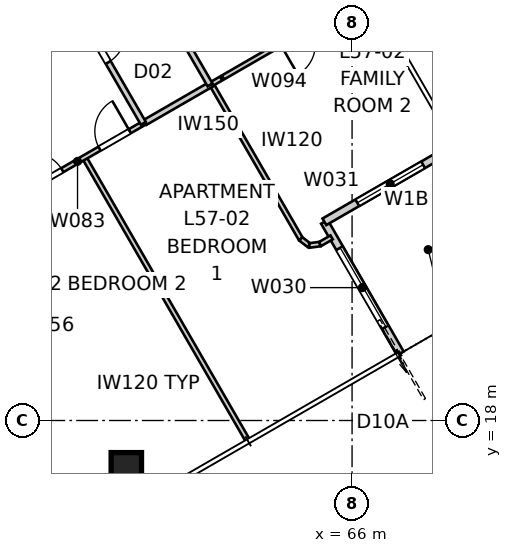
"""IFC4 building model, lengths in metres.
Left out: names, types, materials, properties, quantities, classifications, styles, units other than length and angle.
Written with IfcOpenShell. Run it as: python <this file> out.ifc"""

import sys

from ifc_helpers import new_model, si_unit, direction, frame, frame_2d, origin, origin_2d, place, context, subcontext, project, spatial, rectangle, extrude, element, fill, save


model = new_model("IFC4")
c1 = context("Model", 3, precision=1e-05, world=origin(), true_north=direction((0.0, 1.0)))
c2 = subcontext(c1, "Body", "Model", "MODEL_VIEW")
j1 = project(units=[si_unit("LENGTHUNIT", "METRE"), si_unit("PLANEANGLEUNIT", "RADIAN")], contexts=[c1])
p1 = place(None, origin())
s1 = spatial("IfcSite", under=j1, at=p1, CompositionType="ELEMENT")
p2 = place(p1, origin())
s2 = spatial("IfcBuilding", under=s1, at=p2, CompositionType="ELEMENT")
p3 = place(p2, frame((0.0, 0.0, 208.2)))
s3 = spatial("IfcBuildingStorey", under=s2, at=p3, CompositionType="ELEMENT", Elevation=208.2)
p4 = place(p3, frame((60.06, 16.755, -0.15), z_axis=(0.0, 0.0, 1.0), x_axis=(1.0, 0.0, 0.0)))
e1 = element("IfcColumn", 1, at=p4, inside=s3, PredefinedType="COLUMN", context=c2, shape_type="SweptSolid", body=[
    extrude(rectangle(XDim=0.8, YDim=0.8, at=origin_2d()), origin(), (0.0, 0.0, 1.0), 3.55),
])
p5 = place(p3, frame((67.271, 19.764, 0.0), z_axis=(0.0, 0.0, 1.0), x_axis=(-0.49999894854, 0.866026010844, 0.0)))
e2 = element("IfcWall", 2, at=p5, inside=s3, PredefinedType="SOLIDWALL", context=c2, shape_type="SweptSolid", body=[
    extrude(rectangle(XDim=4.0, YDim=0.2, at=frame_2d((2.0, 0.0))), origin(), (0.0, 0.0, 1.0), 3.25),
])
p6 = place(p5, frame((0.8, 0.0, 0.0)))
e3 = element("IfcOpeningElement", 3, at=p6, cuts=e2, PredefinedType="OPENING", context=c2, shape_type="SweptSolid", body=[
    extrude(rectangle(XDim=2.4, YDim=2.1, at=frame_2d((1.2, 1.05))), frame((0.0, 0.11, 0.0), z_axis=(0.0, -1.0, 0.0), x_axis=(1.0, 0.0, 0.0)), (0.0, 0.0, 1.0), 0.22),
])
p7 = place(p3, frame((65.271, 23.229, 0.0), z_axis=(0.0, 0.0, 1.0), x_axis=(0.866026010844, 0.49999894854, 0.0)))
e4 = element("IfcWall", 4, at=p7, inside=s3, PredefinedType="SOLIDWALL", context=c2, shape_type="SweptSolid", body=[
    extrude(rectangle(XDim=4.0, YDim=0.2, at=frame_2d((2.0, 0.0))), origin(), (0.0, 0.0, 1.0), 3.25),
])
p8 = place(p7, frame((1.0, 0.0, 0.45)))
e5 = element("IfcOpeningElement", 5, at=p8, cuts=e4, PredefinedType="OPENING", context=c2, shape_type="SweptSolid", body=[
    extrude(rectangle(XDim=2.0, YDim=1.8, at=frame_2d((1.0, 0.9))), frame((0.0, 0.11, 0.0), z_axis=(0.0, -1.0, 0.0), x_axis=(1.0, 0.0, 0.0)), (0.0, 0.0, 1.0), 0.22),
])
p9 = place(p3, frame((64.111, 33.239, 0.0), z_axis=(0.0, 0.0, 1.0), x_axis=(-0.866024069551, -0.500002310952, 0.0)))
e6 = element("IfcWall", 6, at=p9, inside=s3, PredefinedType="PARTITIONING", context=c2, shape_type="SweptSolid", body=[
    extrude(rectangle(XDim=10.95, YDim=0.25, at=frame_2d((5.475, 0.0))), origin(), (0.0, 0.0, 1.0), 3.25),
])
p10 = place(p3, frame((63.246, 17.487, 0.0), z_axis=(0.0, 0.0, 1.0), x_axis=(-0.49999898161, 0.866025991751, 0.0)))
e7 = element("IfcWall", 7, at=p10, inside=s3, PredefinedType="PARTITIONING", context=c2, shape_type="SweptSolid", body=[
    extrude(rectangle(XDim=8.585, YDim=0.12, at=frame_2d((4.292, 0.0))), origin(), (0.0, 0.0, 1.0), 3.25),
])
p11 = place(p3, frame((57.0, 23.793, 0.0), z_axis=(0.0, 0.0, 1.0), x_axis=(0.866007146345, 0.50003162148, 0.0)))
e8 = element("IfcWall", 8, at=p11, inside=s3, PredefinedType="PARTITIONING", context=c2, shape_type="SweptSolid", body=[
    extrude(rectangle(XDim=4.101, YDim=0.12, at=frame_2d((2.051, 0.0))), origin(), (0.0, 0.0, 1.0), 3.25),
])
p12 = place(p11, frame((0.668, 0.0, 0.0)))
e9 = element("IfcOpeningElement", 9, at=p12, cuts=e8, PredefinedType="OPENING", context=c2, shape_type="SweptSolid", body=[
    extrude(rectangle(XDim=0.92, YDim=2.34, at=frame_2d((0.46, 1.17))), frame((0.0, 0.07, 0.0), z_axis=(0.0, -1.0, 0.0), x_axis=(1.0, 0.0, 0.0)), (0.0, 0.0, 1.0), 0.14),
])
p13 = place(p11, frame((2.719, 0.0, 0.0)))
e10 = element("IfcOpeningElement", 10, at=p13, cuts=e8, PredefinedType="OPENING", context=c2, shape_type="SweptSolid", body=[
    extrude(rectangle(XDim=0.92, YDim=2.34, at=frame_2d((0.46, 1.17))), frame((0.0, 0.07, 0.0), z_axis=(0.0, -1.0, 0.0), x_axis=(1.0, 0.0, 0.0)), (0.0, 0.0, 1.0), 0.14),
])
p14 = place(p3, frame((62.299, 26.853, 0.0), z_axis=(0.0, 0.0, 1.0), x_axis=(0.500006955494, -0.866021387991, 0.0)))
e11 = element("IfcWall", 11, at=p14, inside=s3, PredefinedType="PARTITIONING", context=c2, shape_type="SweptSolid", body=[
    extrude(rectangle(XDim=4.705, YDim=0.12, at=frame_2d((2.352, 0.0))), origin(), (0.0, 0.0, 1.0), 3.25),
])
p15 = place(p3, frame((64.651, 22.778, 0.0), z_axis=(0.0, 0.0, 1.0), x_axis=(0.793231928283, -0.608919623557, 0.0)))
e12 = element("IfcWall", 12, at=p15, inside=s3, PredefinedType="PARTITIONING", context=c2, shape_type="SweptSolid", body=[
    extrude(rectangle(XDim=0.283, YDim=0.12, at=frame_2d((0.142, 0.0))), origin(), (0.0, 0.0, 1.0), 3.25),
])
p16 = place(p3, frame((64.876, 22.606, 0.0), z_axis=(0.0, 0.0, 1.0), x_axis=(0.991407364485, 0.130810693925, 0.0)))
e13 = element("IfcWall", 13, at=p16, inside=s3, PredefinedType="PARTITIONING", context=c2, shape_type="SweptSolid", body=[
    extrude(rectangle(XDim=0.284, YDim=0.12, at=frame_2d((0.142, 0.0))), origin(), (0.0, 0.0, 1.0), 3.25),
])
p17 = place(p3, frame((65.157, 22.643, 0.0), z_axis=(0.0, 0.0, 1.0), x_axis=(0.866058575552, 0.499942540411, 0.0)))
e14 = element("IfcWall", 14, at=p17, inside=s3, PredefinedType="PARTITIONING", context=c2, shape_type="SweptSolid", body=[
    extrude(rectangle(XDim=0.352, YDim=0.12, at=frame_2d((0.176, 0.0))), origin(), (0.0, 0.0, 1.0), 3.25),
])
p18 = place(p3, frame((60.552, 25.844, 0.0), z_axis=(0.0, 0.0, 1.0), x_axis=(0.866074730264, 0.499914554297, 0.0)))
e15 = element("IfcWall", 15, at=p18, inside=s3, PredefinedType="SOLIDWALL", context=c2, shape_type="SweptSolid", body=[
    extrude(rectangle(XDim=2.017, YDim=0.15, at=frame_2d((1.008, 0.0))), origin(), (0.0, 0.0, 1.0), 3.25),
])
p19 = place(p3, frame((62.555, 27.0, 0.0), z_axis=(0.0, 0.0, 1.0), x_axis=(-0.865896854829, -0.500222587251, 0.0)))
e16 = element("IfcWall", 16, at=p19, inside=s3, PredefinedType="PARTITIONING", context=c2, shape_type="SweptSolid", body=[
    extrude(rectangle(XDim=0.296, YDim=0.12, at=frame_2d((0.148, 0.0))), origin(), (0.0, 0.0, 1.0), 3.25),
])
p20 = place(p3, frame((66.388, 29.214, 0.0), z_axis=(0.0, 0.0, 1.0), x_axis=(-0.866032173762, -0.499988273872, 0.0)))
e17 = element("IfcWall", 17, at=p20, inside=s3, PredefinedType="PARTITIONING", context=c2, shape_type="SweptSolid", body=[
    extrude(rectangle(XDim=4.373, YDim=0.12, at=frame_2d((2.186, 0.0))), origin(), (0.0, 0.0, 1.0), 3.25),
])
p21 = place(p20, frame((1.706, 0.0, 0.0)))
e18 = element("IfcOpeningElement", 18, at=p21, cuts=e17, PredefinedType="OPENING", context=c2, shape_type="SweptSolid", body=[
    extrude(rectangle(XDim=0.92, YDim=2.34, at=frame_2d((0.46, 1.17))), frame((0.0, 0.07, 0.0), z_axis=(0.0, -1.0, 0.0), x_axis=(1.0, 0.0, 0.0)), (0.0, 0.0, 1.0), 0.14),
])
p22 = place(p3, frame((62.263, 26.832, 0.0), z_axis=(0.0, 0.0, 1.0), x_axis=(-0.499999662836, 0.866025598446, 0.0)))
e19 = element("IfcWall", 19, at=p22, inside=s3, PredefinedType="SOLIDWALL", context=c2, shape_type="SweptSolid", body=[
    extrude(rectangle(XDim=4.625, YDim=0.15, at=frame_2d((2.312, 0.0))), origin(), (0.0, 0.0, 1.0), 3.25),
])
p23 = place(p22, frame((1.853, 0.0, 0.0)))
e20 = element("IfcOpeningElement", 20, at=p23, cuts=e19, PredefinedType="OPENING", context=c2, shape_type="SweptSolid", body=[
    extrude(rectangle(XDim=0.92, YDim=2.34, at=frame_2d((0.46, 1.17))), frame((0.0, 0.085, 0.0), z_axis=(0.0, -1.0, 0.0), x_axis=(1.0, 0.0, 0.0)), (0.0, 0.0, 1.0), 0.17),
])
p24 = place(p3, frame((58.196, 29.824, 0.0), z_axis=(0.0, 0.0, 1.0), x_axis=(0.499999662836, -0.866025598446, 0.0)))
e21 = element("IfcWall", 21, at=p24, inside=s3, PredefinedType="SOLIDWALL", context=c2, shape_type="SweptSolid", body=[
    extrude(rectangle(XDim=4.625, YDim=0.15, at=frame_2d((2.312, 0.0))), origin(), (0.0, 0.0, 1.0), 3.25),
])
p25 = place(p24, frame((1.853, 0.0, 0.0)))
e22 = element("IfcOpeningElement", 22, at=p25, cuts=e21, PredefinedType="OPENING", context=c2, shape_type="SweptSolid", body=[
    extrude(rectangle(XDim=0.92, YDim=2.34, at=frame_2d((0.46, 1.17))), frame((0.0, 0.085, 0.0), z_axis=(0.0, -1.0, 0.0), x_axis=(1.0, 0.0, 0.0)), (0.0, 0.0, 1.0), 0.17),
])
p26 = place(p6, origin())
e23 = element("IfcDoor", 23, at=p26, inside=s3, OperationType="SLIDING_TO_LEFT", PredefinedType="DOOR", context=c2, shape_type="SweptSolid", body=[
    extrude(rectangle(XDim=2.4, YDim=2.1, at=frame_2d((1.2, 1.05))), frame((0.0, 0.025, 0.0), z_axis=(0.0, -1.0, 0.0), x_axis=(1.0, 0.0, 0.0)), (0.0, 0.0, 1.0), 0.05),
])
fill(e3, e23)
p27 = place(p8, origin())
e24 = element("IfcWindow", 24, at=p27, inside=s3, PartitioningType="SINGLE_PANEL", PredefinedType="WINDOW", context=c2, shape_type="SweptSolid", body=[
    extrude(rectangle(XDim=2.0, YDim=1.8, at=frame_2d((1.0, 0.9))), frame((0.0, 0.03, 0.0), z_axis=(0.0, -1.0, 0.0), x_axis=(1.0, 0.0, 0.0)), (0.0, 0.0, 1.0), 0.06),
])
fill(e5, e24)
p28 = place(p25, origin())
e25 = element("IfcDoor", 25, at=p28, inside=s3, OperationType="SINGLE_SWING_LEFT", PredefinedType="DOOR", context=c2, shape_type="SweptSolid", body=[
    extrude(rectangle(XDim=0.92, YDim=2.34, at=frame_2d((0.46, 1.17))), frame((0.0, 0.025, 0.0), z_axis=(0.0, -1.0, 0.0), x_axis=(1.0, 0.0, 0.0)), (0.0, 0.0, 1.0), 0.05),
])
fill(e22, e25)
p29 = place(p12, origin())
e26 = element("IfcDoor", 26, at=p29, inside=s3, OperationType="SINGLE_SWING_LEFT", PredefinedType="DOOR", context=c2, shape_type="SweptSolid", body=[
    extrude(rectangle(XDim=0.92, YDim=2.34, at=frame_2d((0.46, 1.17))), frame((0.0, 0.025, 0.0), z_axis=(0.0, -1.0, 0.0), x_axis=(1.0, 0.0, 0.0)), (0.0, 0.0, 1.0), 0.05),
])
fill(e9, e26)
p30 = place(p13, origin())
e27 = element("IfcDoor", 27, at=p30, inside=s3, OperationType="SINGLE_SWING_RIGHT", PredefinedType="DOOR", context=c2, shape_type="SweptSolid", body=[
    extrude(rectangle(XDim=0.92, YDim=2.34, at=frame_2d((0.46, 1.17))), frame((0.0, 0.025, 0.0), z_axis=(0.0, -1.0, 0.0), x_axis=(1.0, 0.0, 0.0)), (0.0, 0.0, 1.0), 0.05),
])
fill(e10, e27)
save(model, sys.argv[1])
